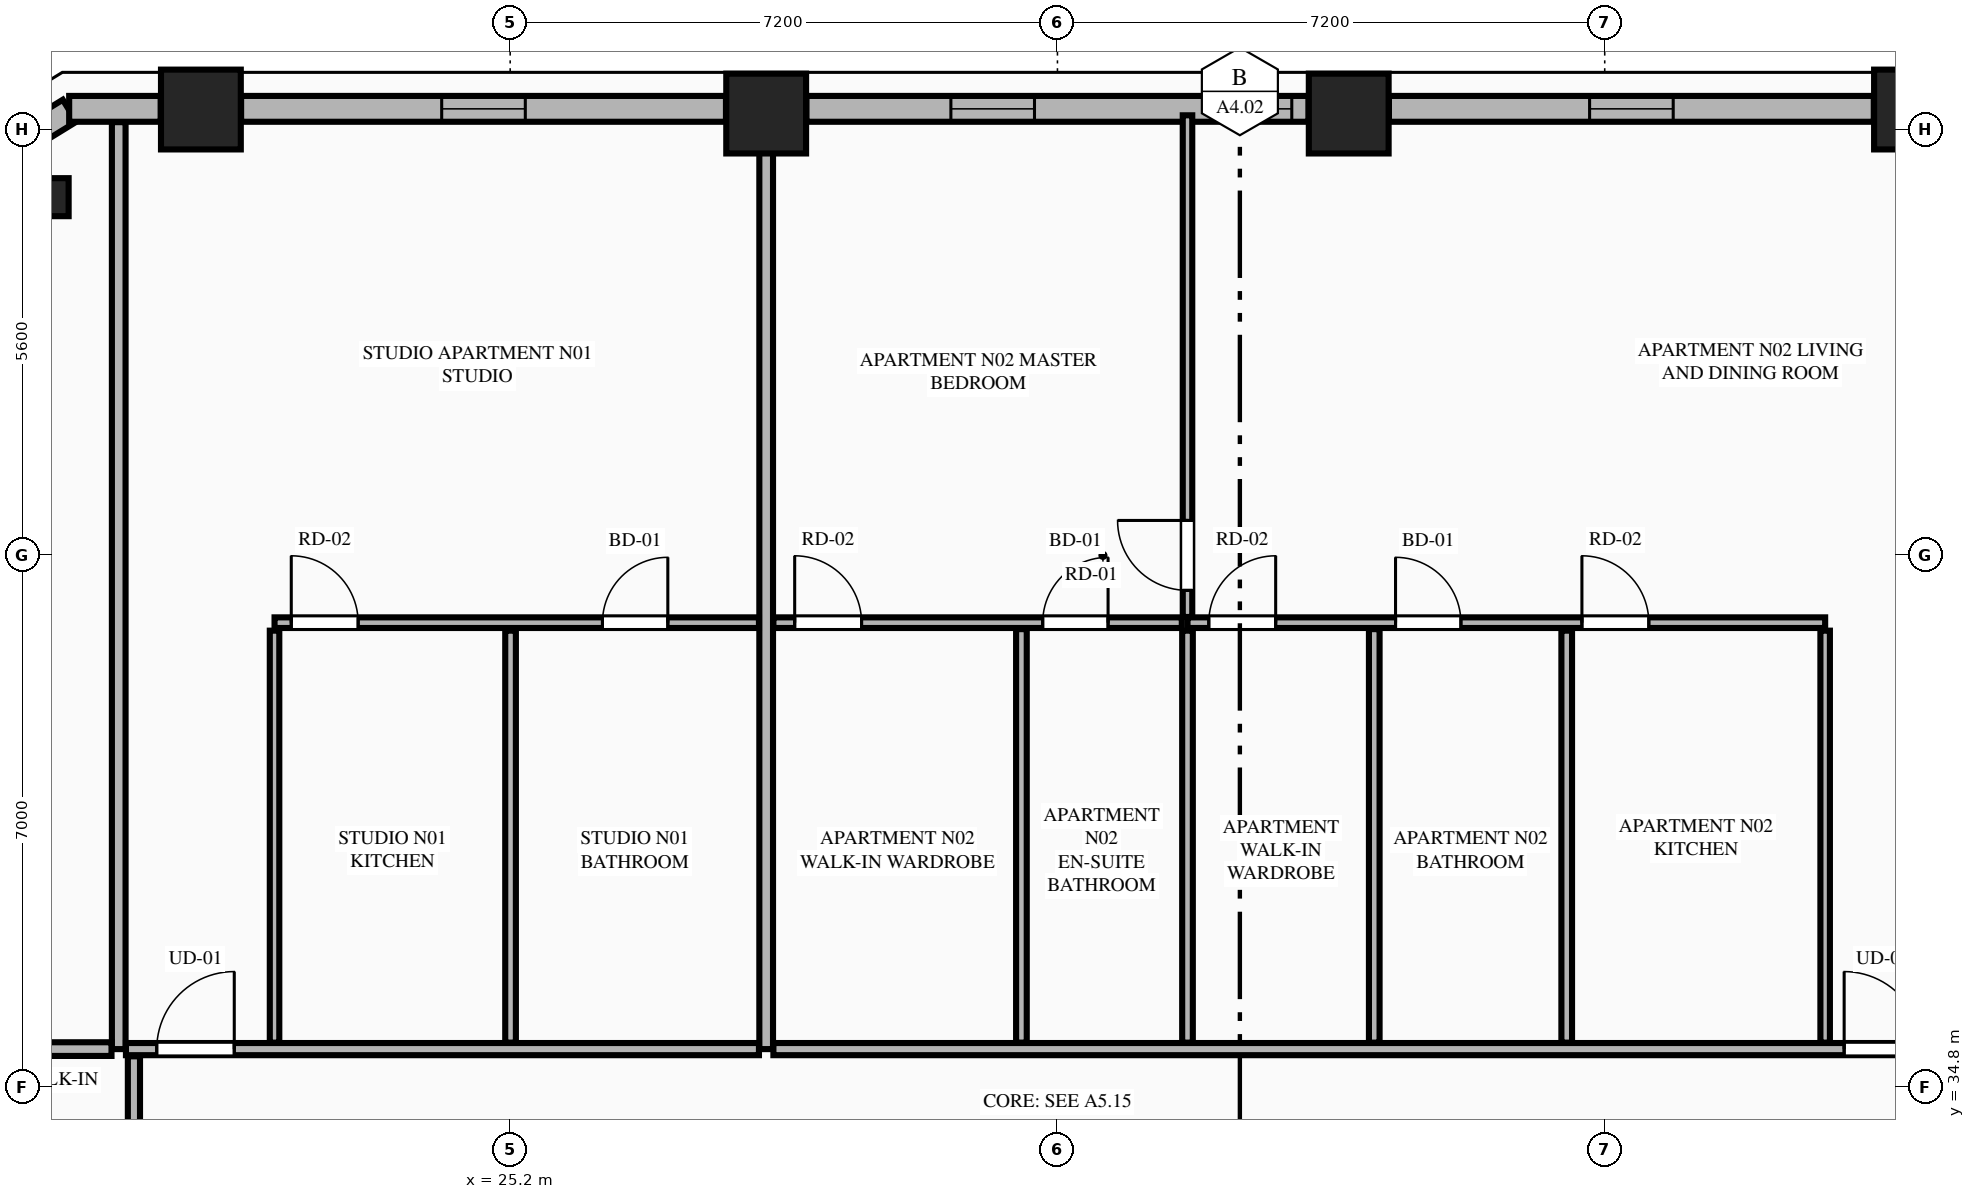
"""IFC4 building model, lengths in metres.
Left out: names, types, materials, properties, quantities, classifications, styles, units other than length and angle.
Written with IfcOpenShell. Run it as: python <this file> out.ifc"""

import sys

from ifc_helpers import new_model, si_unit, direction, frame, frame_2d, origin, origin_2d, place, context, subcontext, project, spatial, rectangle, extrude, element, fill, save


model = new_model("IFC4")
c1 = context("Model", 3, precision=1e-05, world=origin(), true_north=direction((0.0, 1.0)))
c2 = subcontext(c1, "Body", "Model", "MODEL_VIEW")
j1 = project(units=[si_unit("LENGTHUNIT", "METRE"), si_unit("PLANEANGLEUNIT", "RADIAN")], contexts=[c1])
p1 = place(None, origin())
s1 = spatial("IfcSite", under=j1, at=p1, CompositionType="ELEMENT")
p2 = place(p1, origin())
s2 = spatial("IfcBuilding", under=s1, at=p2, CompositionType="ELEMENT")
p3 = place(p2, frame((0.0, 0.0, 105.5)))
s3 = spatial("IfcBuildingStorey", under=s2, at=p3, CompositionType="ELEMENT", Elevation=105.5)
for number, where, z_axis, x_axis in (
    (1, (43.669, 47.661, 0.0), (0.0, 0.0, 1.0), (1.0, 0.0, 0.0)),
    (2, (36.232, 47.608, 0.0), (0.0, 0.0, 1.0), (1.0, 0.0, 0.0)),
    (3, (28.568, 47.608, 0.0), (0.0, 0.0, 1.0), (1.0, 0.0, 0.0)),
    (4, (21.131, 47.661, 0.0), (0.0, 0.0, 1.0), (1.0, 0.0, 0.0)),
):
    element("IfcColumn", number, at=place(p3, frame(where, z_axis=z_axis, x_axis=x_axis)), inside=s3, PredefinedType="COLUMN", context=c2, shape_type="SweptSolid", body=[
        extrude(rectangle(XDim=1.05, YDim=1.05, at=origin_2d()), origin(), (0.0, 0.0, 1.0), 3.55),
    ])
p4 = place(p3, frame((19.141, 46.508, 0.0), z_axis=(0.0, 0.0, 1.0), x_axis=(-0.865160173452, -0.501495637342, 0.0)))
e5 = element("IfcColumn", 5, at=p4, inside=s3, PredefinedType="PILASTER", context=c2, shape_type="SweptSolid", body=[
    extrude(rectangle(XDim=0.5, YDim=0.35, at=origin_2d()), origin(), (0.0, 0.0, 1.0), 3.55),
])
p5 = place(p3, frame((19.403, 47.645, 0.0), z_axis=(0.0, 0.0, 1.0), x_axis=(-0.851798915137, -0.523868884523, 0.0)))
e6 = element("IfcWall", 6, at=p5, inside=s3, PredefinedType="STANDARD", context=c2, shape_type="SweptSolid", body=[
    extrude(rectangle(XDim=1.848, YDim=0.34, at=frame_2d((0.924, 0.0))), origin(), (0.0, 0.0, 1.0), 3.34),
])
p6 = place(p3, frame((43.14, 47.67, 0.0), z_axis=(0.0, 0.0, 1.0), x_axis=(-1.0, 0.0, 0.0)))
e7 = element("IfcWall", 7, at=p6, inside=s3, PredefinedType="STANDARD", context=c2, shape_type="SweptSolid", body=[
    extrude(rectangle(XDim=6.379, YDim=0.34, at=frame_2d((3.189, 0.0))), origin(), (0.0, 0.0, 1.0), 2.797),
])
p7 = place(p6, frame((2.639, 0.0, 0.75)))
e8 = element("IfcOpeningElement", 8, at=p7, cuts=e7, PredefinedType="OPENING", context=c2, shape_type="SweptSolid", body=[
    extrude(rectangle(XDim=1.1, YDim=1.897, at=frame_2d((0.55, 0.948))), frame((0.0, 0.18, 0.0), z_axis=(0.0, -1.0, 0.0), x_axis=(1.0, 0.0, 0.0)), (0.0, 0.0, 1.0), 0.36),
])
p8 = place(p3, frame((35.703, 47.67, 0.0), z_axis=(0.0, 0.0, 1.0), x_axis=(-1.0, 0.0, 0.0)))
e9 = element("IfcWall", 9, at=p8, inside=s3, PredefinedType="STANDARD", context=c2, shape_type="SweptSolid", body=[
    extrude(rectangle(XDim=6.606, YDim=0.34, at=frame_2d((3.303, 0.0))), origin(), (0.0, 0.0, 1.0), 2.797),
])
p9 = place(p8, frame((0.22, 0.0, 0.75)))
e10 = element("IfcOpeningElement", 10, at=p9, cuts=e9, PredefinedType="OPENING", context=c2, shape_type="SweptSolid", body=[
    extrude(rectangle(XDim=1.04, YDim=1.897, at=frame_2d((0.52, 0.948))), frame((0.0, 0.18, 0.0), z_axis=(0.0, -1.0, 0.0), x_axis=(1.0, 0.0, 0.0)), (0.0, 0.0, 1.0), 0.36),
])
p10 = place(p8, frame((3.605, 0.0, 0.75)))
e11 = element("IfcOpeningElement", 11, at=p10, cuts=e9, PredefinedType="OPENING", context=c2, shape_type="SweptSolid", body=[
    extrude(rectangle(XDim=1.1, YDim=1.897, at=frame_2d((0.55, 0.948))), frame((0.0, 0.18, 0.0), z_axis=(0.0, -1.0, 0.0), x_axis=(1.0, 0.0, 0.0)), (0.0, 0.0, 1.0), 0.36),
])
p11 = place(p3, frame((28.039, 47.67, 0.0), z_axis=(0.0, 0.0, 1.0), x_axis=(-1.0, 0.0, 0.0)))
e12 = element("IfcWall", 12, at=p11, inside=s3, PredefinedType="STANDARD", context=c2, shape_type="SweptSolid", body=[
    extrude(rectangle(XDim=6.379, YDim=0.34, at=frame_2d((3.189, 0.0))), origin(), (0.0, 0.0, 1.0), 2.797),
])
p12 = place(p11, frame((2.64, 0.0, 0.75)))
e13 = element("IfcOpeningElement", 13, at=p12, cuts=e12, PredefinedType="OPENING", context=c2, shape_type="SweptSolid", body=[
    extrude(rectangle(XDim=1.1, YDim=1.897, at=frame_2d((0.55, 0.948))), frame((0.0, 0.18, 0.0), z_axis=(0.0, -1.0, 0.0), x_axis=(1.0, 0.0, 0.0)), (0.0, 0.0, 1.0), 0.36),
])
p13 = place(p3, frame((20.602, 47.67, 0.0), z_axis=(0.0, 0.0, 1.0), x_axis=(-1.0, 0.0, 0.0)))
e14 = element("IfcWall", 14, at=p13, inside=s3, PredefinedType="STANDARD", context=c2, shape_type="SweptSolid", body=[
    extrude(rectangle(XDim=1.204, YDim=0.34, at=frame_2d((0.602, 0.0))), origin(), (0.0, 0.0, 1.0), 3.34),
])
p14 = place(p3, frame((20.05, 35.3, 0.0), z_axis=(0.0, 0.0, 1.0), x_axis=(0.0, 1.0, 0.0)))
e15 = element("IfcWall", 15, at=p14, inside=s3, PredefinedType="PARTITIONING", context=c2, shape_type="SweptSolid", body=[
    extrude(rectangle(XDim=12.195, YDim=0.18, at=frame_2d((6.098, 0.0))), origin(), (0.0, 0.0, 1.0), 3.34),
])
p15 = place(p3, frame((28.568, 35.3, 0.0), z_axis=(0.0, 0.0, 1.0), x_axis=(0.0, 1.0, 0.0)))
e16 = element("IfcWall", 16, at=p15, inside=s3, PredefinedType="PARTITIONING", context=c2, shape_type="SweptSolid", body=[
    extrude(rectangle(XDim=12.195, YDim=0.18, at=frame_2d((6.098, 0.0))), origin(), (0.0, 0.0, 1.0), 2.722),
])
p16 = place(p3, frame((20.145, 35.3, 0.0), z_axis=(0.0, 0.0, 1.0), x_axis=(1.0, 0.0, 0.0)))
e17 = element("IfcWall", 17, at=p16, inside=s3, PredefinedType="PARTITIONING", context=c2, shape_type="SweptSolid", body=[
    extrude(rectangle(XDim=8.328, YDim=0.16, at=frame_2d((4.164, 0.0))), origin(), (0.0, 0.0, 1.0), 3.34),
])
p17 = place(p16, frame((0.405, 0.0, 0.0)))
e18 = element("IfcOpeningElement", 18, at=p17, cuts=e17, PredefinedType="OPENING", context=c2, shape_type="SweptSolid", body=[
    extrude(rectangle(XDim=1.02, YDim=2.25, at=frame_2d((0.51, 1.125))), frame((0.0, 0.09, 0.0), z_axis=(0.0, -1.0, 0.0), x_axis=(1.0, 0.0, 0.0)), (0.0, 0.0, 1.0), 0.18),
])
p18 = place(p3, frame((22.1, 35.385, 0.0), z_axis=(0.0, 0.0, 1.0), x_axis=(0.0, 1.0, 0.0)))
e19 = element("IfcWall", 19, at=p18, inside=s3, PredefinedType="PARTITIONING", context=c2, shape_type="SweptSolid", body=[
    extrude(rectangle(XDim=5.42, YDim=0.125, at=frame_2d((2.71, 0.0))), origin(), (0.0, 0.0, 1.0), 2.722),
])
p19 = place(p3, frame((22.1, 40.91, 0.0), z_axis=(0.0, 0.0, 1.0), x_axis=(1.0, 0.0, 0.0)))
e20 = element("IfcWall", 20, at=p19, inside=s3, PredefinedType="PLUMBINGWALL", context=c2, shape_type="SweptSolid", body=[
    extrude(rectangle(XDim=6.373, YDim=0.14, at=frame_2d((3.187, 0.0))), origin(), (0.0, 0.0, 1.0), 3.34),
])
p20 = place(p19, frame((4.314, 0.0, 0.0)))
e21 = element("IfcOpeningElement", 21, at=p20, cuts=e20, PredefinedType="OPENING", context=c2, shape_type="SweptSolid", body=[
    extrude(rectangle(XDim=0.86, YDim=2.1, at=frame_2d((0.43, 1.05))), frame((0.0, 0.08, 0.0), z_axis=(0.0, -1.0, 0.0), x_axis=(1.0, 0.0, 0.0)), (0.0, 0.0, 1.0), 0.16),
])
p21 = place(p19, frame((0.22, 0.0, 0.0)))
e22 = element("IfcOpeningElement", 22, at=p21, cuts=e20, PredefinedType="OPENING", context=c2, shape_type="SweptSolid", body=[
    extrude(rectangle(XDim=0.88, YDim=2.15, at=frame_2d((0.44, 1.075))), frame((0.0, 0.08, 0.0), z_axis=(0.0, -1.0, 0.0), x_axis=(1.0, 0.0, 0.0)), (0.0, 0.0, 1.0), 0.16),
])
p22 = place(p3, frame((25.205, 35.385, 0.0), z_axis=(0.0, 0.0, 1.0), x_axis=(0.0, 1.0, 0.0)))
e23 = element("IfcWall", 23, at=p22, inside=s3, PredefinedType="PLUMBINGWALL", context=c2, shape_type="SweptSolid", body=[
    extrude(rectangle(XDim=5.42, YDim=0.14, at=frame_2d((2.71, 0.0))), origin(), (0.0, 0.0, 1.0), 3.34),
])
p23 = place(p3, frame((28.663, 35.3, 0.0), z_axis=(0.0, 0.0, 1.0), x_axis=(1.0, 0.0, 0.0)))
e24 = element("IfcWall", 24, at=p23, inside=s3, PredefinedType="PARTITIONING", context=c2, shape_type="SweptSolid", body=[
    extrude(rectangle(XDim=15.992, YDim=0.16, at=frame_2d((7.996, 0.0))), origin(), (0.0, 0.0, 1.0), 3.34),
])
p24 = place(p23, frame((14.087, 0.0, 0.0)))
e25 = element("IfcOpeningElement", 25, at=p24, cuts=e24, PredefinedType="OPENING", context=c2, shape_type="SweptSolid", body=[
    extrude(rectangle(XDim=1.02, YDim=2.25, at=frame_2d((0.51, 1.125))), frame((0.0, 0.09, 0.0), z_axis=(0.0, -1.0, 0.0), x_axis=(1.0, 0.0, 0.0)), (0.0, 0.0, 1.0), 0.18),
])
p25 = place(p3, frame((42.5, 35.385, 0.0), z_axis=(0.0, 0.0, 1.0), x_axis=(0.0, 1.0, 0.0)))
e26 = element("IfcWall", 26, at=p25, inside=s3, PredefinedType="PARTITIONING", context=c2, shape_type="SweptSolid", body=[
    extrude(rectangle(XDim=5.42, YDim=0.125, at=frame_2d((2.71, 0.0))), origin(), (0.0, 0.0, 1.0), 2.722),
])
p26 = place(p3, frame((34.111, 40.91, 0.0), z_axis=(0.0, 0.0, 1.0), x_axis=(1.0, 0.0, 0.0)))
e27 = element("IfcWall", 27, at=p26, inside=s3, PredefinedType="PLUMBINGWALL", context=c2, shape_type="SweptSolid", body=[
    extrude(rectangle(XDim=8.389, YDim=0.14, at=frame_2d((4.194, 0.0))), origin(), (0.0, 0.0, 1.0), 3.34),
])
p27 = place(p26, frame((0.28, 0.0, 0.0)))
e28 = element("IfcOpeningElement", 28, at=p27, cuts=e27, PredefinedType="OPENING", context=c2, shape_type="SweptSolid", body=[
    extrude(rectangle(XDim=0.88, YDim=2.15, at=frame_2d((0.44, 1.075))), frame((0.0, 0.08, 0.0), z_axis=(0.0, -1.0, 0.0), x_axis=(1.0, 0.0, 0.0)), (0.0, 0.0, 1.0), 0.16),
])
p28 = place(p26, frame((2.737, 0.0, 0.0)))
e29 = element("IfcOpeningElement", 29, at=p28, cuts=e27, PredefinedType="OPENING", context=c2, shape_type="SweptSolid", body=[
    extrude(rectangle(XDim=0.86, YDim=2.1, at=frame_2d((0.43, 1.05))), frame((0.0, 0.08, 0.0), z_axis=(0.0, -1.0, 0.0), x_axis=(1.0, 0.0, 0.0)), (0.0, 0.0, 1.0), 0.16),
])
p29 = place(p26, frame((5.189, 0.0, 0.0)))
e30 = element("IfcOpeningElement", 30, at=p29, cuts=e27, PredefinedType="OPENING", context=c2, shape_type="SweptSolid", body=[
    extrude(rectangle(XDim=0.88, YDim=2.15, at=frame_2d((0.44, 1.075))), frame((0.0, 0.08, 0.0), z_axis=(0.0, -1.0, 0.0), x_axis=(1.0, 0.0, 0.0)), (0.0, 0.0, 1.0), 0.16),
])
p30 = place(p3, frame((28.663, 40.91, 0.0), z_axis=(0.0, 0.0, 1.0), x_axis=(1.0, 0.0, 0.0)))
e31 = element("IfcWall", 31, at=p30, inside=s3, PredefinedType="PLUMBINGWALL", context=c2, shape_type="SweptSolid", body=[
    extrude(rectangle(XDim=5.373, YDim=0.14, at=frame_2d((2.687, 0.0))), origin(), (0.0, 0.0, 1.0), 3.34),
])
p31 = place(p30, frame((0.28, 0.0, 0.0)))
e32 = element("IfcOpeningElement", 32, at=p31, cuts=e31, PredefinedType="OPENING", context=c2, shape_type="SweptSolid", body=[
    extrude(rectangle(XDim=0.88, YDim=2.15, at=frame_2d((0.44, 1.075))), frame((0.0, 0.08, 0.0), z_axis=(0.0, -1.0, 0.0), x_axis=(1.0, 0.0, 0.0)), (0.0, 0.0, 1.0), 0.16),
])
p32 = place(p30, frame((3.543, 0.0, 0.0)))
e33 = element("IfcOpeningElement", 33, at=p32, cuts=e31, PredefinedType="OPENING", context=c2, shape_type="SweptSolid", body=[
    extrude(rectangle(XDim=0.86, YDim=2.1, at=frame_2d((0.43, 1.05))), frame((0.0, 0.08, 0.0), z_axis=(0.0, -1.0, 0.0), x_axis=(1.0, 0.0, 0.0)), (0.0, 0.0, 1.0), 0.16),
])
for number, where, z_axis, x_axis in (
    (34, (39.1, 35.385, 0.0), (0.0, 0.0, 1.0), (0.0, 1.0, 0.0)),
    (35, (34.111, 35.385, 0.0), (0.0, 0.0, 1.0), (0.0, 1.0, 0.0)),
):
    element("IfcWall", number, at=place(p3, frame(where, z_axis=z_axis, x_axis=x_axis)), inside=s3, PredefinedType="PLUMBINGWALL", context=c2, shape_type="SweptSolid", body=[
        extrude(rectangle(XDim=5.42, YDim=0.14, at=frame_2d((2.71, 0.0))), origin(), (0.0, 0.0, 1.0), 3.34),
    ])
p33 = place(p3, frame((34.111, 40.985, 0.0), z_axis=(0.0, 0.0, 1.0), x_axis=(0.0, 1.0, 0.0)))
e36 = element("IfcWall", 36, at=p33, inside=s3, PredefinedType="PARTITIONING", context=c2, shape_type="SweptSolid", body=[
    extrude(rectangle(XDim=6.6, YDim=0.125, at=frame_2d((3.3, 0.0))), origin(), (0.0, 0.0, 1.0), 3.34),
])
p34 = place(p33, frame((0.35, 0.0, 0.0)))
e37 = element("IfcOpeningElement", 37, at=p34, cuts=e36, PredefinedType="OPENING", context=c2, shape_type="SweptSolid", body=[
    extrude(rectangle(XDim=0.92, YDim=2.15, at=frame_2d((0.46, 1.075))), frame((0.0, 0.073, 0.0), z_axis=(0.0, -1.0, 0.0), x_axis=(1.0, 0.0, 0.0)), (0.0, 0.0, 1.0), 0.145),
])
for number, where, z_axis, x_axis in (
    (38, (36.568, 35.385, 0.0), (0.0, 0.0, 1.0), (0.0, 1.0, 0.0)),
    (39, (31.926, 35.385, 0.0), (0.0, 0.0, 1.0), (0.0, 1.0, 0.0)),
):
    element("IfcWall", number, at=place(p3, frame(where, z_axis=z_axis, x_axis=x_axis)), inside=s3, PredefinedType="PLUMBINGWALL", context=c2, shape_type="SweptSolid", body=[
        extrude(rectangle(XDim=5.44, YDim=0.14, at=frame_2d((2.72, 0.0))), origin(), (0.0, 0.0, 1.0), 3.34),
    ])
p35 = place(p3, frame((12.286, 35.3, 0.0), z_axis=(0.0, 0.0, 1.0), x_axis=(1.0, 0.0, 0.0)))
e40 = element("IfcWall", 40, at=p35, inside=s3, PredefinedType="PARTITIONING", context=c2, shape_type="SweptSolid", body=[
    extrude(rectangle(XDim=7.669, YDim=0.18, at=frame_2d((3.834, 0.0))), origin(), (0.0, 0.0, 1.0), 3.34),
])
p36 = place(p3, frame((20.25, 16.595, 0.0), z_axis=(0.0, 0.0, 1.0), x_axis=(0.0, 1.0, 0.0)))
e41 = element("IfcWall", 41, at=p36, inside=s3, PredefinedType="PARTITIONING", context=c2, shape_type="SweptSolid", body=[
    extrude(rectangle(XDim=18.61, YDim=0.16, at=frame_2d((9.305, 0.0))), origin(), (0.0, 0.0, 1.0), 3.34),
])
p37 = place(p36, frame((0.45, 0.0, 0.0)))
e42 = element("IfcOpeningElement", 42, at=p37, cuts=e41, PredefinedType="OPENING", context=c2, shape_type="SweptSolid", body=[
    extrude(rectangle(XDim=1.02, YDim=2.25, at=frame_2d((0.51, 1.125))), frame((0.0, 0.09, 0.0), z_axis=(0.0, -1.0, 0.0), x_axis=(1.0, 0.0, 0.0)), (0.0, 0.0, 1.0), 0.18),
])
p38 = place(p7, origin())
e43 = element("IfcWindow", 43, at=p38, inside=s3, PartitioningType="SINGLE_PANEL", PredefinedType="WINDOW", context=c2, shape_type="SweptSolid", body=[
    extrude(rectangle(XDim=1.1, YDim=1.897, at=frame_2d((0.55, 0.948))), frame((0.0, 0.03, 0.0), z_axis=(0.0, -1.0, 0.0), x_axis=(1.0, 0.0, 0.0)), (0.0, 0.0, 1.0), 0.06),
])
fill(e8, e43)
p39 = place(p9, origin())
e44 = element("IfcWindow", 44, at=p39, inside=s3, PartitioningType="SINGLE_PANEL", PredefinedType="WINDOW", context=c2, shape_type="SweptSolid", body=[
    extrude(rectangle(XDim=1.04, YDim=1.897, at=frame_2d((0.52, 0.948))), frame((0.0, 0.03, 0.0), z_axis=(0.0, -1.0, 0.0), x_axis=(1.0, 0.0, 0.0)), (0.0, 0.0, 1.0), 0.06),
])
fill(e10, e44)
p40 = place(p12, origin())
e45 = element("IfcWindow", 45, at=p40, inside=s3, PartitioningType="SINGLE_PANEL", PredefinedType="WINDOW", context=c2, shape_type="SweptSolid", body=[
    extrude(rectangle(XDim=1.1, YDim=1.897, at=frame_2d((0.55, 0.948))), frame((0.0, 0.03, 0.0), z_axis=(0.0, -1.0, 0.0), x_axis=(1.0, 0.0, 0.0)), (0.0, 0.0, 1.0), 0.06),
])
fill(e13, e45)
p41 = place(p20, origin())
e46 = element("IfcDoor", 46, at=p41, inside=s3, OperationType="SINGLE_SWING_RIGHT", PredefinedType="DOOR", context=c2, shape_type="SweptSolid", body=[
    extrude(rectangle(XDim=0.86, YDim=2.1, at=frame_2d((0.43, 1.05))), frame((0.0, 0.025, 0.0), z_axis=(0.0, -1.0, 0.0), x_axis=(1.0, 0.0, 0.0)), (0.0, 0.0, 1.0), 0.05),
])
fill(e21, e46)
p42 = place(p17, origin())
e47 = element("IfcDoor", 47, at=p42, inside=s3, OperationType="SINGLE_SWING_RIGHT", PredefinedType="DOOR", context=c2, shape_type="SweptSolid", body=[
    extrude(rectangle(XDim=1.02, YDim=2.25, at=frame_2d((0.51, 1.125))), frame((0.0, 0.025, 0.0), z_axis=(0.0, -1.0, 0.0), x_axis=(1.0, 0.0, 0.0)), (0.0, 0.0, 1.0), 0.05),
])
fill(e18, e47)
p43 = place(p21, origin())
e48 = element("IfcDoor", 48, at=p43, inside=s3, OperationType="SINGLE_SWING_LEFT", PredefinedType="DOOR", context=c2, shape_type="SweptSolid", body=[
    extrude(rectangle(XDim=0.88, YDim=2.15, at=frame_2d((0.44, 1.075))), frame((0.0, 0.025, 0.0), z_axis=(0.0, -1.0, 0.0), x_axis=(1.0, 0.0, 0.0)), (0.0, 0.0, 1.0), 0.05),
])
fill(e22, e48)
p44 = place(p27, origin())
e49 = element("IfcDoor", 49, at=p44, inside=s3, OperationType="SINGLE_SWING_RIGHT", PredefinedType="DOOR", context=c2, shape_type="SweptSolid", body=[
    extrude(rectangle(XDim=0.88, YDim=2.15, at=frame_2d((0.44, 1.075))), frame((0.0, 0.025, 0.0), z_axis=(0.0, -1.0, 0.0), x_axis=(1.0, 0.0, 0.0)), (0.0, 0.0, 1.0), 0.05),
])
fill(e28, e49)
p45 = place(p28, origin())
e50 = element("IfcDoor", 50, at=p45, inside=s3, OperationType="SINGLE_SWING_LEFT", PredefinedType="DOOR", context=c2, shape_type="SweptSolid", body=[
    extrude(rectangle(XDim=0.86, YDim=2.1, at=frame_2d((0.43, 1.05))), frame((0.0, 0.025, 0.0), z_axis=(0.0, -1.0, 0.0), x_axis=(1.0, 0.0, 0.0)), (0.0, 0.0, 1.0), 0.05),
])
fill(e29, e50)
p46 = place(p31, origin())
e51 = element("IfcDoor", 51, at=p46, inside=s3, OperationType="SINGLE_SWING_LEFT", PredefinedType="DOOR", context=c2, shape_type="SweptSolid", body=[
    extrude(rectangle(XDim=0.88, YDim=2.15, at=frame_2d((0.44, 1.075))), frame((0.0, 0.025, 0.0), z_axis=(0.0, -1.0, 0.0), x_axis=(1.0, 0.0, 0.0)), (0.0, 0.0, 1.0), 0.05),
])
fill(e32, e51)
p47 = place(p32, origin())
e52 = element("IfcDoor", 52, at=p47, inside=s3, OperationType="SINGLE_SWING_RIGHT", PredefinedType="DOOR", context=c2, shape_type="SweptSolid", body=[
    extrude(rectangle(XDim=0.86, YDim=2.1, at=frame_2d((0.43, 1.05))), frame((0.0, 0.025, 0.0), z_axis=(0.0, -1.0, 0.0), x_axis=(1.0, 0.0, 0.0)), (0.0, 0.0, 1.0), 0.05),
])
fill(e33, e52)
p48 = place(p24, origin())
e53 = element("IfcDoor", 53, at=p48, inside=s3, OperationType="SINGLE_SWING_LEFT", PredefinedType="DOOR", context=c2, shape_type="SweptSolid", body=[
    extrude(rectangle(XDim=1.02, YDim=2.25, at=frame_2d((0.51, 1.125))), frame((0.0, 0.025, 0.0), z_axis=(0.0, -1.0, 0.0), x_axis=(1.0, 0.0, 0.0)), (0.0, 0.0, 1.0), 0.05),
])
fill(e25, e53)
p49 = place(p29, origin())
e54 = element("IfcDoor", 54, at=p49, inside=s3, OperationType="SINGLE_SWING_LEFT", PredefinedType="DOOR", context=c2, shape_type="SweptSolid", body=[
    extrude(rectangle(XDim=0.88, YDim=2.15, at=frame_2d((0.44, 1.075))), frame((0.0, 0.025, 0.0), z_axis=(0.0, -1.0, 0.0), x_axis=(1.0, 0.0, 0.0)), (0.0, 0.0, 1.0), 0.05),
])
fill(e30, e54)
p50 = place(p34, origin())
e55 = element("IfcDoor", 55, at=p50, inside=s3, OperationType="SINGLE_SWING_RIGHT", PredefinedType="DOOR", context=c2, shape_type="SweptSolid", body=[
    extrude(rectangle(XDim=0.92, YDim=2.15, at=frame_2d((0.46, 1.075))), frame((0.0, 0.025, 0.0), z_axis=(0.0, -1.0, 0.0), x_axis=(1.0, 0.0, 0.0)), (0.0, 0.0, 1.0), 0.05),
])
fill(e37, e55)
p51 = place(p10, origin())
e56 = element("IfcWindow", 56, at=p51, inside=s3, PartitioningType="SINGLE_PANEL", PredefinedType="WINDOW", context=c2, shape_type="SweptSolid", body=[
    extrude(rectangle(XDim=1.1, YDim=1.897, at=frame_2d((0.55, 0.948))), frame((0.0, 0.03, 0.0), z_axis=(0.0, -1.0, 0.0), x_axis=(1.0, 0.0, 0.0)), (0.0, 0.0, 1.0), 0.06),
])
fill(e11, e56)
save(model, sys.argv[1])
